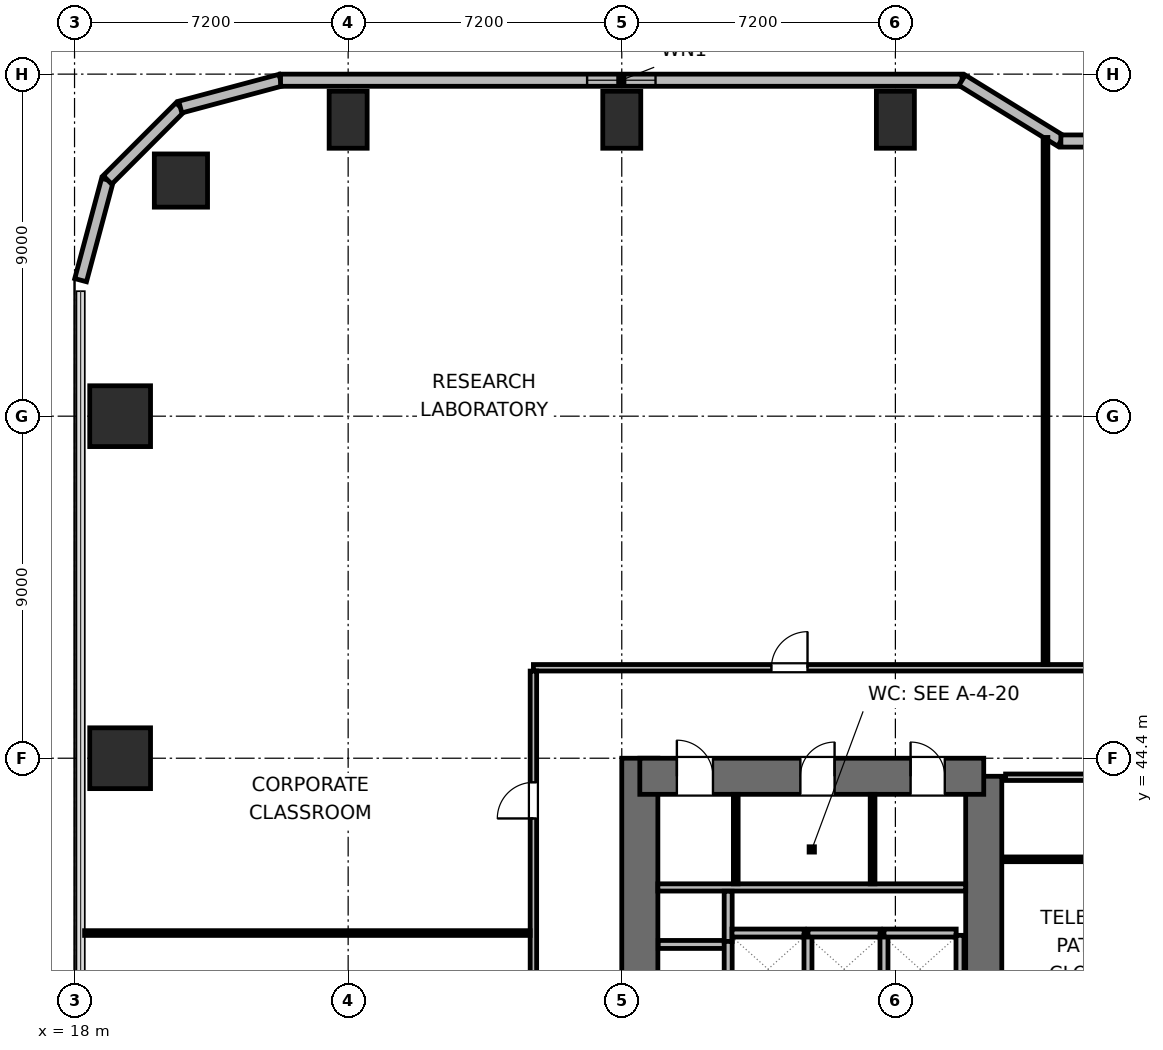
"""IFC4 building model, lengths in metres.
Left out: names, types, materials, properties, quantities, classifications, styles, units other than length and angle.
Written with IfcOpenShell. Run it as: python <this file> out.ifc"""

import sys

from ifc_helpers import new_model, si_unit, direction, frame, frame_2d, origin, origin_2d, place, context, subcontext, project, spatial, rectangle, circle, extrude, element, fill, save


model = new_model("IFC4")
c1 = context("Model", 3, precision=1e-05, world=origin(), true_north=direction((0.0, 1.0)))
c2 = subcontext(c1, "Body", "Model", "MODEL_VIEW")
j1 = project(units=[si_unit("LENGTHUNIT", "METRE"), si_unit("PLANEANGLEUNIT", "RADIAN")], contexts=[c1])
p1 = place(None, origin())
s1 = spatial("IfcSite", under=j1, at=p1, CompositionType="ELEMENT")
p2 = place(p1, origin())
s2 = spatial("IfcBuilding", under=s1, at=p2, CompositionType="ELEMENT")
p3 = place(p2, frame((0.0, 0.0, 68.4)))
s3 = spatial("IfcBuildingStorey", under=s2, at=p3, CompositionType="ELEMENT", Elevation=68.4)
p4 = place(p3, frame((32.875, 27.6, 0.0), z_axis=(0.0, 0.0, 1.0), x_axis=(0.0, 1.0, 0.0)))
e1 = element("IfcWall", 1, at=p4, inside=s3, PredefinedType="SHEAR", context=c2, shape_type="SweptSolid", body=[
    extrude(rectangle(XDim=16.8, YDim=0.95, at=frame_2d((8.4, 0.0))), origin(), (0.0, 0.0, 1.0), 4.5),
])
p5 = place(p3, frame((41.925, 37.8, 0.0), z_axis=(0.0, 0.0, 1.0), x_axis=(0.0, 1.0, 0.0)))
e2 = element("IfcWall", 2, at=p5, inside=s3, PredefinedType="SHEAR", context=c2, shape_type="SweptSolid", body=[
    extrude(rectangle(XDim=6.125, YDim=0.95, at=frame_2d((3.062, 0.0))), origin(), (0.0, 0.0, 1.0), 4.5),
])
p6 = place(p3, frame((32.875, 43.925, 0.0), z_axis=(0.0, 0.0, 1.0), x_axis=(1.0, 0.0, 0.0)))
e3 = element("IfcWall", 3, at=p6, inside=s3, PredefinedType="SHEAR", context=c2, shape_type="SweptSolid", body=[
    extrude(rectangle(XDim=9.05, YDim=0.95, at=frame_2d((4.525, 0.0))), origin(), (0.0, 0.0, 1.0), 4.5),
])
p7 = place(p6, frame((0.975, 0.0, 0.0)))
e4 = element("IfcOpeningElement", 4, at=p7, cuts=e3, PredefinedType="OPENING", context=c2, shape_type="SweptSolid", body=[
    extrude(rectangle(XDim=0.95, YDim=2.04, at=frame_2d((0.475, 1.02))), frame((0.0, 0.485, 0.0), z_axis=(0.0, -1.0, 0.0), x_axis=(1.0, 0.0, 0.0)), (0.0, 0.0, 1.0), 0.97),
])
p8 = place(p6, frame((4.225, 0.0, 0.0)))
e5 = element("IfcOpeningElement", 5, at=p8, cuts=e3, PredefinedType="OPENING", context=c2, shape_type="SweptSolid", body=[
    extrude(rectangle(XDim=0.9, YDim=2.02, at=frame_2d((0.45, 1.01))), frame((0.0, 0.485, 0.0), z_axis=(0.0, -1.0, 0.0), x_axis=(1.0, 0.0, 0.0)), (0.0, 0.0, 1.0), 0.97),
])
p9 = place(p6, frame((7.125, 0.0, 0.0)))
e6 = element("IfcOpeningElement", 6, at=p9, cuts=e3, PredefinedType="OPENING", context=c2, shape_type="SweptSolid", body=[
    extrude(rectangle(XDim=0.9, YDim=2.02, at=frame_2d((0.45, 1.01))), frame((0.0, 0.485, 0.0), z_axis=(0.0, -1.0, 0.0), x_axis=(1.0, 0.0, 0.0)), (0.0, 0.0, 1.0), 0.97),
])
p10 = place(p3, frame((20.8, 59.6, 0.0), z_axis=(0.0, 0.0, 1.0), x_axis=(1.0, 0.0, 0.0)))
e7 = element("IfcColumn", 7, at=p10, inside=s3, PredefinedType="COLUMN", context=c2, shape_type="SweptSolid", body=[
    extrude(circle(Radius=0.7, at=origin_2d()), origin(), (0.0, 0.0, 1.0), 4.5),
])
for number, where, z_axis, x_axis in (
    (8, (25.2, 61.2, 0.0), (0.0, 0.0, 1.0), (1.0, 0.0, 0.0)),
    (9, (32.4, 61.2, 0.0), (0.0, 0.0, 1.0), (1.0, 0.0, 0.0)),
    (10, (39.6, 61.2, 0.0), (0.0, 0.0, 1.0), (1.0, 0.0, 0.0)),
):
    element("IfcColumn", number, at=place(p3, frame(where, z_axis=z_axis, x_axis=x_axis)), inside=s3, PredefinedType="COLUMN", context=c2, shape_type="SweptSolid", body=[
        extrude(rectangle(XDim=1.0, YDim=1.5, at=origin_2d()), origin(), (0.0, 0.0, 1.0), 4.5),
    ])
for number, where, z_axis, x_axis in (
    (11, (19.2, 44.4, 0.0), (0.0, 0.0, 1.0), (1.0, 0.0, 0.0)),
    (12, (19.2, 53.4, 0.0), (0.0, 0.0, 1.0), (1.0, 0.0, 0.0)),
):
    element("IfcColumn", number, at=place(p3, frame(where, z_axis=z_axis, x_axis=x_axis)), inside=s3, PredefinedType="COLUMN", context=c2, shape_type="SweptSolid", body=[
        extrude(rectangle(XDim=1.6, YDim=1.6, at=origin_2d()), origin(), (0.0, 0.0, 1.0), 4.5),
    ])
p11 = place(p3, frame((18.16, 56.979, 0.0), z_axis=(0.0, 0.0, 1.0), x_axis=(0.25869736047, 0.965958423373, 0.0)))
e13 = element("IfcWall", 13, at=p11, inside=s3, PredefinedType="SOLIDWALL", context=c2, shape_type="SweptSolid", body=[
    extrude(rectangle(XDim=2.731, YDim=0.32, at=frame_2d((1.366, 0.0))), origin(), (0.0, 0.0, 1.0), 4.24),
])
p12 = place(p3, frame((18.866, 59.617, 0.0), z_axis=(0.0, 0.0, 1.0), x_axis=(0.707106781187, 0.707106781187, 0.0)))
e14 = element("IfcWall", 14, at=p12, inside=s3, PredefinedType="SOLIDWALL", context=c2, shape_type="SweptSolid", body=[
    extrude(rectangle(XDim=2.71, YDim=0.32, at=frame_2d((1.355, 0.0))), origin(), (0.0, 0.0, 1.0), 4.24),
])
p13 = place(p3, frame((20.783, 61.533, 0.0), z_axis=(0.0, 0.0, 1.0), x_axis=(0.965964405026, 0.25867502435, 0.0)))
e15 = element("IfcWall", 15, at=p13, inside=s3, PredefinedType="SOLIDWALL", context=c2, shape_type="SweptSolid", body=[
    extrude(rectangle(XDim=2.731, YDim=0.32, at=frame_2d((1.366, 0.0))), origin(), (0.0, 0.0, 1.0), 4.24),
])
p14 = place(p3, frame((23.421, 62.24, 0.0), z_axis=(0.0, 0.0, 1.0), x_axis=(1.0, 0.0, 0.0)))
e16 = element("IfcWall", 16, at=p14, inside=s3, PredefinedType="SOLIDWALL", context=c2, shape_type="SweptSolid", body=[
    extrude(rectangle(XDim=17.934, YDim=0.32, at=frame_2d((8.967, 0.0))), origin(), (0.0, 0.0, 1.0), 4.24),
])
p15 = place(p14, frame((8.067, 0.0, 0.85)))
e17 = element("IfcOpeningElement", 17, at=p15, cuts=e16, PredefinedType="OPENING", context=c2, shape_type="SweptSolid", body=[
    extrude(rectangle(XDim=1.8, YDim=1.1, at=frame_2d((0.9, 0.55))), frame((0.0, 0.17, 0.0), z_axis=(0.0, -1.0, 0.0), x_axis=(1.0, 0.0, 0.0)), (0.0, 0.0, 1.0), 0.34),
])
p16 = place(p3, frame((41.355, 62.24, 0.0), z_axis=(0.0, 0.0, 1.0), x_axis=(0.851630857047, -0.524142044989, 0.0)))
e18 = element("IfcWall", 18, at=p16, inside=s3, PredefinedType="SOLIDWALL", context=c2, shape_type="SweptSolid", body=[
    extrude(rectangle(XDim=3.053, YDim=0.32, at=frame_2d((1.526, 0.0))), origin(), (0.0, 0.0, 1.0), 3.475),
])
p17 = place(p3, frame((43.955, 60.64, 0.0), z_axis=(0.0, 0.0, 1.0), x_axis=(1.0, 0.0, 0.0)))
e19 = element("IfcWall", 19, at=p17, inside=s3, PredefinedType="SOLIDWALL", context=c2, shape_type="SweptSolid", body=[
    extrude(rectangle(XDim=4.685, YDim=0.32, at=frame_2d((2.343, 0.0))), origin(), (0.0, 0.0, 1.0), 3.475),
])
p18 = place(p17, frame((1.743, 0.0, 0.85)))
e20 = element("IfcOpeningElement", 20, at=p18, cuts=e19, PredefinedType="OPENING", context=c2, shape_type="SweptSolid", body=[
    extrude(rectangle(XDim=1.2, YDim=1.1, at=frame_2d((0.6, 0.55))), frame((0.0, 0.17, 0.0), z_axis=(0.0, -1.0, 0.0), x_axis=(1.0, 0.0, 0.0)), (0.0, 0.0, 1.0), 0.34),
])
p19 = place(p3, frame((33.35, 41.0, 0.0), z_axis=(0.0, 0.0, 1.0), x_axis=(1.0, 0.0, 0.0)))
e21 = element("IfcWall", 21, at=p19, inside=s3, PredefinedType="PLUMBINGWALL", context=c2, shape_type="SweptSolid", body=[
    extrude(rectangle(XDim=8.1, YDim=0.19, at=frame_2d((4.05, 0.0))), origin(), (0.0, 0.0, 1.0), 4.24),
])
for number, where, z_axis, x_axis in (
    (22, (35.4, 41.095, 0.0), (0.0, 0.0, 1.0), (0.0, 1.0, 0.0)),
    (23, (39.0, 41.095, 0.0), (0.0, 0.0, 1.0), (0.0, 1.0, 0.0)),
):
    element("IfcWall", number, at=place(p3, frame(where, z_axis=z_axis, x_axis=x_axis)), inside=s3, PredefinedType="PARTITIONING", context=c2, shape_type="SweptSolid", body=[
        extrude(rectangle(XDim=2.355, YDim=0.125, at=frame_2d((1.177, 0.0))), origin(), (0.0, 0.0, 1.0), 4.24),
    ])
p20 = place(p3, frame((33.36, 39.5, 0.0), z_axis=(0.0, 0.0, 1.0), x_axis=(1.0, 0.0, 0.0)))
e24 = element("IfcWall", 24, at=p20, inside=s3, PredefinedType="PARTITIONING", context=c2, shape_type="SweptSolid", body=[
    extrude(rectangle(XDim=1.86, YDim=0.21, at=frame_2d((0.93, 0.0))), origin(), (0.0, 0.0, 1.0), 4.24),
])
p21 = place(p3, frame((35.2, 39.58, 0.0), z_axis=(0.0, 0.0, 1.0), x_axis=(0.0, 1.0, 0.0)))
e25 = element("IfcWall", 25, at=p21, inside=s3, PredefinedType="PARTITIONING", context=c2, shape_type="SweptSolid", body=[
    extrude(rectangle(XDim=1.32, YDim=0.21, at=frame_2d((0.66, 0.0))), origin(), (0.0, 0.0, 1.0), 4.24),
])
p22 = place(p3, frame((35.3, 39.8, 0.0), z_axis=(0.0, 0.0, 1.0), x_axis=(1.0, 0.0, 0.0)))
e26 = element("IfcWall", 26, at=p22, inside=s3, PredefinedType="PARTITIONING", context=c2, shape_type="SweptSolid", body=[
    extrude(rectangle(XDim=1.9, YDim=0.21, at=frame_2d((0.95, 0.0))), origin(), (0.0, 0.0, 1.0), 4.24),
])
p23 = place(p3, frame((35.2, 37.96, 0.0), z_axis=(0.0, 0.0, 1.0), x_axis=(0.0, 1.0, 0.0)))
e27 = element("IfcWall", 27, at=p23, inside=s3, PredefinedType="PARTITIONING", context=c2, shape_type="SweptSolid", body=[
    extrude(rectangle(XDim=1.62, YDim=0.21, at=frame_2d((0.81, 0.0))), origin(), (0.0, 0.0, 1.0), 4.24),
])
p24 = place(p3, frame((37.3, 37.96, 0.0), z_axis=(0.0, 0.0, 1.0), x_axis=(0.0, 1.0, 0.0)))
e28 = element("IfcWall", 28, at=p24, inside=s3, PredefinedType="PARTITIONING", context=c2, shape_type="SweptSolid", body=[
    extrude(rectangle(XDim=1.78, YDim=0.21, at=frame_2d((0.89, 0.0))), origin(), (0.0, 0.0, 1.0), 4.24),
])
p25 = place(p3, frame((37.3, 39.8, 0.0), z_axis=(0.0, 0.0, 1.0), x_axis=(1.0, 0.0, 0.0)))
e29 = element("IfcWall", 29, at=p25, inside=s3, PredefinedType="PARTITIONING", context=c2, shape_type="SweptSolid", body=[
    extrude(rectangle(XDim=1.9, YDim=0.21, at=frame_2d((0.95, 0.0))), origin(), (0.0, 0.0, 1.0), 4.24),
])
p26 = place(p3, frame((39.3, 37.96, 0.0), z_axis=(0.0, 0.0, 1.0), x_axis=(0.0, 1.0, 0.0)))
e30 = element("IfcWall", 30, at=p26, inside=s3, PredefinedType="PARTITIONING", context=c2, shape_type="SweptSolid", body=[
    extrude(rectangle(XDim=1.78, YDim=0.21, at=frame_2d((0.89, 0.0))), origin(), (0.0, 0.0, 1.0), 4.24),
])
p27 = place(p3, frame((39.3, 39.8, 0.0), z_axis=(0.0, 0.0, 1.0), x_axis=(1.0, 0.0, 0.0)))
e31 = element("IfcWall", 31, at=p27, inside=s3, PredefinedType="PARTITIONING", context=c2, shape_type="SweptSolid", body=[
    extrude(rectangle(XDim=1.9, YDim=0.21, at=frame_2d((0.95, 0.0))), origin(), (0.0, 0.0, 1.0), 4.24),
])
p28 = place(p3, frame((41.3, 37.96, 0.0), z_axis=(0.0, 0.0, 1.0), x_axis=(0.0, 1.0, 0.0)))
e32 = element("IfcWall", 32, at=p28, inside=s3, PredefinedType="PARTITIONING", context=c2, shape_type="SweptSolid", body=[
    extrude(rectangle(XDim=1.78, YDim=0.21, at=frame_2d((0.89, 0.0))), origin(), (0.0, 0.0, 1.0), 4.24),
])
p29 = place(p3, frame((42.5, 43.9, 0.0), z_axis=(0.0, 0.0, 1.0), x_axis=(1.0, 0.0, 0.0)))
e33 = element("IfcWall", 33, at=p29, inside=s3, PredefinedType="PARTITIONING", context=c2, shape_type="SweptSolid", body=[
    extrude(rectangle(XDim=4.213, YDim=0.17, at=frame_2d((2.106, 0.0))), origin(), (0.0, 0.0, 1.0), 3.125),
])
p30 = place(p3, frame((42.5, 41.74, 0.0), z_axis=(0.0, 0.0, 1.0), x_axis=(1.0, 0.0, 0.0)))
e34 = element("IfcWall", 34, at=p30, inside=s3, PredefinedType="PARTITIONING", context=c2, shape_type="SweptSolid", body=[
    extrude(rectangle(XDim=4.213, YDim=0.125, at=frame_2d((2.106, 0.0))), origin(), (0.0, 0.0, 1.0), 4.24),
])
p31 = place(p3, frame((30.075, 46.78, 0.0), z_axis=(0.0, 0.0, 1.0), x_axis=(1.0, 0.0, 0.0)))
e35 = element("IfcWall", 35, at=p31, inside=s3, PredefinedType="PARTITIONING", context=c2, shape_type="SweptSolid", body=[
    extrude(rectangle(XDim=35.85, YDim=0.17, at=frame_2d((17.925, 0.0))), origin(), (0.0, 0.0, 1.0), 4.24),
])
p32 = place(p31, frame((6.263, 0.0, 0.0)))
e36 = element("IfcOpeningElement", 36, at=p32, cuts=e35, PredefinedType="OPENING", context=c2, shape_type="SweptSolid", body=[
    extrude(rectangle(XDim=0.95, YDim=2.04, at=frame_2d((0.475, 1.02))), frame((0.0, 0.095, 0.0), z_axis=(0.0, -1.0, 0.0), x_axis=(1.0, 0.0, 0.0)), (0.0, 0.0, 1.0), 0.19),
])
p33 = place(p31, frame((20.52, 0.0, 0.0)))
e37 = element("IfcOpeningElement", 37, at=p33, cuts=e35, PredefinedType="OPENING", context=c2, shape_type="SweptSolid", body=[
    extrude(rectangle(XDim=0.95, YDim=2.04, at=frame_2d((0.475, 1.02))), frame((0.0, 0.095, 0.0), z_axis=(0.0, -1.0, 0.0), x_axis=(1.0, 0.0, 0.0)), (0.0, 0.0, 1.0), 0.19),
])
p34 = place(p31, frame((31.708, 0.0, 0.0)))
e38 = element("IfcOpeningElement", 38, at=p34, cuts=e35, PredefinedType="OPENING", context=c2, shape_type="SweptSolid", body=[
    extrude(rectangle(XDim=0.95, YDim=2.04, at=frame_2d((0.475, 1.02))), frame((0.0, 0.095, 0.0), z_axis=(0.0, -1.0, 0.0), x_axis=(1.0, 0.0, 0.0)), (0.0, 0.0, 1.0), 0.19),
])
p35 = place(p3, frame((30.075, 25.307, 0.0), z_axis=(0.0, 0.0, 1.0), x_axis=(0.0, 1.0, 0.0)))
e39 = element("IfcWall", 39, at=p35, inside=s3, PredefinedType="PARTITIONING", context=c2, shape_type="SweptSolid", body=[
    extrude(rectangle(XDim=21.386, YDim=0.17, at=frame_2d((10.693, 0.0))), origin(), (0.0, 0.0, 1.0), 4.24),
])
p36 = place(p35, frame((3.528, 0.0, 0.0)))
e40 = element("IfcOpeningElement", 40, at=p36, cuts=e39, PredefinedType="OPENING", context=c2, shape_type="SweptSolid", body=[
    extrude(rectangle(XDim=0.95, YDim=2.04, at=frame_2d((0.475, 1.02))), frame((0.0, 0.095, 0.0), z_axis=(0.0, -1.0, 0.0), x_axis=(1.0, 0.0, 0.0)), (0.0, 0.0, 1.0), 0.19),
])
p37 = place(p35, frame((10.818, 0.0, 0.0)))
e41 = element("IfcOpeningElement", 41, at=p37, cuts=e39, PredefinedType="OPENING", context=c2, shape_type="SweptSolid", body=[
    extrude(rectangle(XDim=0.95, YDim=2.04, at=frame_2d((0.475, 1.02))), frame((0.0, 0.095, 0.0), z_axis=(0.0, -1.0, 0.0), x_axis=(1.0, 0.0, 0.0)), (0.0, 0.0, 1.0), 0.19),
])
p38 = place(p35, frame((17.508, 0.0, 0.0)))
e42 = element("IfcOpeningElement", 42, at=p38, cuts=e39, PredefinedType="OPENING", context=c2, shape_type="SweptSolid", body=[
    extrude(rectangle(XDim=0.95, YDim=2.04, at=frame_2d((0.475, 1.02))), frame((0.0, 0.095, 0.0), z_axis=(0.0, -1.0, 0.0), x_axis=(1.0, 0.0, 0.0)), (0.0, 0.0, 1.0), 0.19),
])
p39 = place(p3, frame((43.55, 46.867, 0.0), z_axis=(0.0, 0.0, 1.0), x_axis=(0.0, 1.0, 0.0)))
e43 = element("IfcWall", 43, at=p39, inside=s3, PredefinedType="PARTITIONING", context=c2, shape_type="SweptSolid", body=[
    extrude(rectangle(XDim=13.867, YDim=0.125, at=frame_2d((6.934, 0.0))), origin(), (0.0, 0.0, 1.0), 3.603),
])
p40 = place(p3, frame((18.265, 39.8, 0.0), z_axis=(0.0, 0.0, 1.0), x_axis=(1.0, 0.0, 0.0)))
e44 = element("IfcWall", 44, at=p40, inside=s3, PredefinedType="PARTITIONING", context=c2, shape_type="SweptSolid", body=[
    extrude(rectangle(XDim=11.723, YDim=0.125, at=frame_2d((5.862, 0.0))), origin(), (0.0, 0.0, 1.0), 4.24),
])
p41 = place(p15, origin())
e45 = element("IfcWindow", 45, at=p41, inside=s3, PartitioningType="SINGLE_PANEL", PredefinedType="WINDOW", context=c2, shape_type="SweptSolid", body=[
    extrude(rectangle(XDim=1.8, YDim=1.1, at=frame_2d((0.9, 0.55))), frame((0.0, 0.03, 0.0), z_axis=(0.0, -1.0, 0.0), x_axis=(1.0, 0.0, 0.0)), (0.0, 0.0, 1.0), 0.06),
])
fill(e17, e45)
p42 = place(p7, origin())
e46 = element("IfcDoor", 46, at=p42, inside=s3, OperationType="SINGLE_SWING_LEFT", PredefinedType="DOOR", context=c2, shape_type="SweptSolid", body=[
    extrude(rectangle(XDim=0.95, YDim=2.04, at=frame_2d((0.475, 1.02))), frame((0.0, 0.025, 0.0), z_axis=(0.0, -1.0, 0.0), x_axis=(1.0, 0.0, 0.0)), (0.0, 0.0, 1.0), 0.05),
])
fill(e4, e46)
p43 = place(p8, origin())
e47 = element("IfcDoor", 47, at=p43, inside=s3, OperationType="SINGLE_SWING_RIGHT", PredefinedType="DOOR", context=c2, shape_type="SweptSolid", body=[
    extrude(rectangle(XDim=0.9, YDim=2.02, at=frame_2d((0.45, 1.01))), frame((0.0, 0.025, 0.0), z_axis=(0.0, -1.0, 0.0), x_axis=(1.0, 0.0, 0.0)), (0.0, 0.0, 1.0), 0.05),
])
fill(e5, e47)
p44 = place(p9, origin())
e48 = element("IfcDoor", 48, at=p44, inside=s3, OperationType="SINGLE_SWING_LEFT", PredefinedType="DOOR", context=c2, shape_type="SweptSolid", body=[
    extrude(rectangle(XDim=0.9, YDim=2.02, at=frame_2d((0.45, 1.01))), frame((0.0, 0.025, 0.0), z_axis=(0.0, -1.0, 0.0), x_axis=(1.0, 0.0, 0.0)), (0.0, 0.0, 1.0), 0.05),
])
fill(e6, e48)
p45 = place(p32, origin())
e49 = element("IfcDoor", 49, at=p45, inside=s3, OperationType="SINGLE_SWING_RIGHT", PredefinedType="DOOR", context=c2, shape_type="SweptSolid", body=[
    extrude(rectangle(XDim=0.95, YDim=2.04, at=frame_2d((0.475, 1.02))), frame((0.0, 0.025, 0.0), z_axis=(0.0, -1.0, 0.0), x_axis=(1.0, 0.0, 0.0)), (0.0, 0.0, 1.0), 0.05),
])
fill(e36, e49)
p46 = place(p38, origin())
e50 = element("IfcDoor", 50, at=p46, inside=s3, OperationType="SINGLE_SWING_LEFT", PredefinedType="DOOR", context=c2, shape_type="SweptSolid", body=[
    extrude(rectangle(XDim=0.95, YDim=2.04, at=frame_2d((0.475, 1.02))), frame((0.0, 0.025, 0.0), z_axis=(0.0, -1.0, 0.0), x_axis=(1.0, 0.0, 0.0)), (0.0, 0.0, 1.0), 0.05),
])
fill(e42, e50)
save(model, sys.argv[1])
